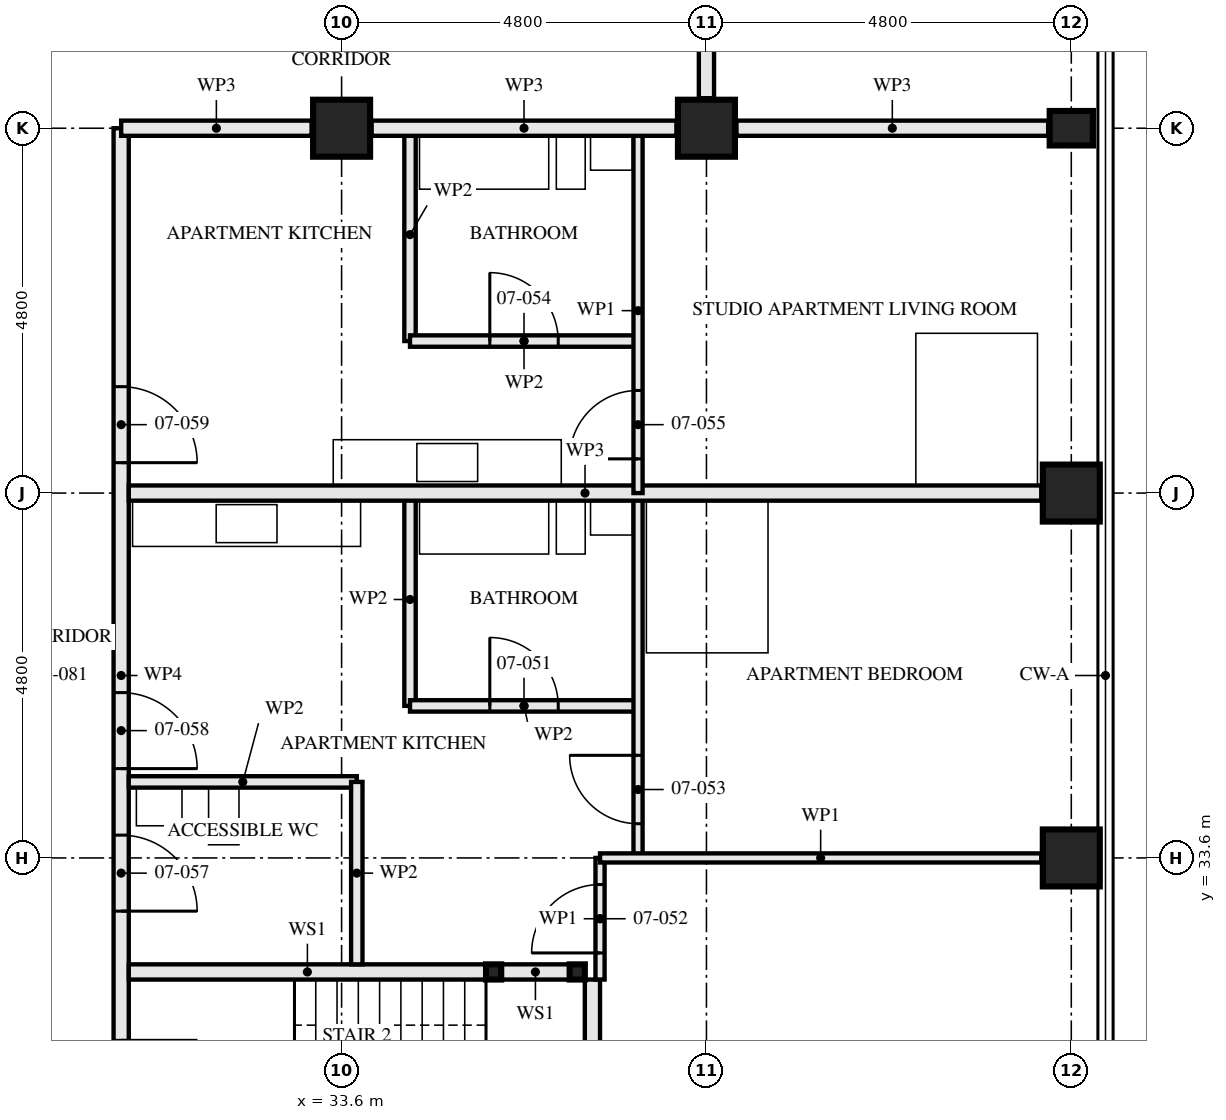
"""IFC4 building model, lengths in metres.
Left out: names, types, materials, properties, quantities, classifications, styles, units other than length and angle.
Written with IfcOpenShell. Run it as: python <this file> out.ifc"""

import sys

from ifc_helpers import new_model, si_unit, direction, frame, frame_2d, origin, origin_2d, place, context, subcontext, project, spatial, rectangle, hollow_rectangle, i_section, extrude, element, fill, save


model = new_model("IFC4")
c1 = context("Model", 3, precision=1e-05, world=origin(), true_north=direction((0.0, 1.0)))
c2 = subcontext(c1, "Body", "Model", "MODEL_VIEW")
j1 = project(units=[si_unit("LENGTHUNIT", "METRE"), si_unit("PLANEANGLEUNIT", "RADIAN")], contexts=[c1])
p1 = place(None, origin())
s1 = spatial("IfcSite", under=j1, at=p1, CompositionType="ELEMENT")
p2 = place(p1, origin())
s2 = spatial("IfcBuilding", under=s1, at=p2, CompositionType="ELEMENT")
p3 = place(p2, frame((0.0, 0.0, 30.5)))
s3 = spatial("IfcBuildingStorey", under=s2, at=p3, CompositionType="ELEMENT", Elevation=30.5)
for number, where, z_axis, x_axis in (
    (1, (33.6, 43.2, 0.0), (0.0, 0.0, 1.0), (0.0, 1.0, 0.0)),
    (2, (38.4, 43.2, 0.0), (0.0, 0.0, 1.0), (0.0, 1.0, 0.0)),
    (3, (43.2, 33.6, 0.0), (0.0, 0.0, 1.0), (1.0, 0.0, 0.0)),
    (4, (43.2, 38.4, 0.0), (0.0, 0.0, 1.0), (1.0, 0.0, 0.0)),
):
    element("IfcColumn", number, at=place(p3, frame(where, z_axis=z_axis, x_axis=x_axis)), inside=s3, PredefinedType="COLUMN", context=c2, shape_type="SweptSolid", body=[
        extrude(hollow_rectangle(XDim=0.75, YDim=0.75, WallThickness=0.08, at=origin_2d()), origin(), (0.0, 0.0, 1.0), 3.5),
    ])
p4 = place(p3, frame((43.2, 43.2, 0.0), z_axis=(0.0, 0.0, 1.0), x_axis=(0.0, 1.0, 0.0)))
e5 = element("IfcColumn", 5, at=p4, inside=s3, PredefinedType="COLUMN", context=c2, shape_type="SweptSolid", body=[
    extrude(i_section(OverallWidth=0.454, OverallDepth=0.569, WebThickness=0.078, FlangeThickness=0.125, FilletRadius=0.015, at=origin_2d()), origin(), (0.0, 0.0, 1.0), 3.5),
])
for number, where, z_axis, x_axis in (
    (6, (36.7, 32.1, 0.0), (0.0, 0.0, 1.0), (1.0, 0.0, 0.0)),
    (7, (35.6, 32.1, 0.0), (0.0, 0.0, 1.0), (1.0, 0.0, 0.0)),
):
    element("IfcColumn", number, at=place(p3, frame(where, z_axis=z_axis, x_axis=x_axis)), inside=s3, PredefinedType="COLUMN", context=c2, shape_type="SweptSolid", body=[
        extrude(hollow_rectangle(XDim=0.2, YDim=0.2, WallThickness=0.008, at=origin_2d()), origin(), (0.0, 0.0, 1.0), 3.33),
    ])
p5 = place(p3, frame((36.6, 32.1, 0.0), z_axis=(0.0, 0.0, 1.0), x_axis=(-1.0, 0.0, 0.0)))
e8 = element("IfcWall", 8, at=p5, inside=s3, PredefinedType="SOLIDWALL", context=c2, shape_type="SweptSolid", body=[
    extrude(rectangle(XDim=0.9, YDim=0.2, at=frame_2d((0.45, 0.0))), origin(), (0.0, 0.0, 1.0), 2.99),
])
p6 = place(p3, frame((35.5, 32.1, 0.0), z_axis=(0.0, 0.0, 1.0), x_axis=(-1.0, 0.0, 0.0)))
e9 = element("IfcWall", 9, at=p6, inside=s3, PredefinedType="SOLIDWALL", context=c2, shape_type="SweptSolid", body=[
    extrude(rectangle(XDim=4.7, YDim=0.2, at=frame_2d((2.35, 0.0))), origin(), (0.0, 0.0, 1.0), 2.99),
])
p7 = place(p3, frame((36.9, 29.4, 0.0), z_axis=(0.0, 0.0, 1.0), x_axis=(0.0, 1.0, 0.0)))
e10 = element("IfcWall", 10, at=p7, inside=s3, PredefinedType="SOLIDWALL", context=c2, shape_type="SweptSolid", body=[
    extrude(rectangle(XDim=2.6, YDim=0.2, at=frame_2d((1.3, 0.0))), origin(), (0.0, 0.0, 1.0), 3.33),
])
p8 = place(p3, frame((33.8, 32.2, 0.0), z_axis=(0.0, 0.0, 1.0), x_axis=(0.0, 1.0, 0.0)))
e11 = element("IfcWall", 11, at=p8, inside=s3, PredefinedType="PARTITIONING", context=c2, shape_type="SweptSolid", body=[
    extrude(rectangle(XDim=2.4, YDim=0.15, at=frame_2d((1.2, 0.0))), origin(), (0.0, 0.0, 1.0), 2.55),
])
p9 = place(p3, frame((33.8, 34.6, 0.0), z_axis=(0.0, 0.0, 1.0), x_axis=(-1.0, 0.0, 0.0)))
e12 = element("IfcWall", 12, at=p9, inside=s3, PredefinedType="PARTITIONING", context=c2, shape_type="SweptSolid", body=[
    extrude(rectangle(XDim=3.0, YDim=0.15, at=frame_2d((1.5, 0.0))), origin(), (0.0, 0.0, 1.0), 3.33),
])
p10 = place(p3, frame((37.5, 35.6, 0.0), z_axis=(0.0, 0.0, 1.0), x_axis=(-1.0, 0.0, 0.0)))
e13 = element("IfcWall", 13, at=p10, inside=s3, PredefinedType="PARTITIONING", context=c2, shape_type="SweptSolid", body=[
    extrude(rectangle(XDim=3.0, YDim=0.15, at=frame_2d((1.5, 0.0))), origin(), (0.0, 0.0, 1.0), 3.33),
])
p11 = place(p10, frame((1.05, 0.0, 0.0)))
e14 = element("IfcOpeningElement", 14, at=p11, cuts=e13, PredefinedType="OPENING", context=c2, shape_type="SweptSolid", body=[
    extrude(rectangle(XDim=0.9, YDim=2.1, at=frame_2d((0.45, 1.05))), frame((0.0, 0.085, 0.0), z_axis=(0.0, -1.0, 0.0), x_axis=(1.0, 0.0, 0.0)), (0.0, 0.0, 1.0), 0.171),
])
p12 = place(p3, frame((34.5, 35.6, 0.0), z_axis=(0.0, 0.0, 1.0), x_axis=(0.0, 1.0, 0.0)))
e15 = element("IfcWall", 15, at=p12, inside=s3, PredefinedType="PARTITIONING", context=c2, shape_type="SweptSolid", body=[
    extrude(rectangle(XDim=2.8, YDim=0.15, at=frame_2d((1.4, 0.0))), origin(), (0.0, 0.0, 1.0), 3.33),
])
p13 = place(p3, frame((37.0, 32.0, 0.0), z_axis=(0.0, 0.0, 1.0), x_axis=(0.0, 1.0, 0.0)))
e16 = element("IfcWall", 16, at=p13, inside=s3, PredefinedType="PARTITIONING", context=c2, shape_type="SweptSolid", body=[
    extrude(rectangle(XDim=1.6, YDim=0.12, at=frame_2d((0.8, 0.0))), origin(), (0.0, 0.0, 1.0), 3.33),
])
p14 = place(p13, frame((0.35, 0.0, 0.0)))
e17 = element("IfcOpeningElement", 17, at=p14, cuts=e16, PredefinedType="OPENING", context=c2, shape_type="SweptSolid", body=[
    extrude(rectangle(XDim=0.9, YDim=2.1, at=frame_2d((0.45, 1.05))), frame((0.0, 0.071, 0.0), z_axis=(0.0, -1.0, 0.0), x_axis=(1.0, 0.0, 0.0)), (0.0, 0.0, 1.0), 0.141),
])
p15 = place(p3, frame((37.5, 33.6, 0.0), z_axis=(0.0, 0.0, 1.0), x_axis=(0.0, 1.0, 0.0)))
e18 = element("IfcWall", 18, at=p15, inside=s3, PredefinedType="PARTITIONING", context=c2, shape_type="SweptSolid", body=[
    extrude(rectangle(XDim=4.8, YDim=0.12, at=frame_2d((2.4, 0.0))), origin(), (0.0, 0.0, 1.0), 3.33),
])
p16 = place(p15, frame((0.45, 0.0, 0.0)))
e19 = element("IfcOpeningElement", 19, at=p16, cuts=e18, PredefinedType="OPENING", context=c2, shape_type="SweptSolid", body=[
    extrude(rectangle(XDim=0.9, YDim=2.1, at=frame_2d((0.45, 1.05))), frame((0.0, 0.071, 0.0), z_axis=(0.0, -1.0, 0.0), x_axis=(1.0, 0.0, 0.0)), (0.0, 0.0, 1.0), 0.141),
])
p17 = place(p3, frame((42.805, 33.6, 0.0), z_axis=(0.0, 0.0, 1.0), x_axis=(-1.0, 0.0, 0.0)))
e20 = element("IfcWall", 20, at=p17, inside=s3, PredefinedType="PARTITIONING", context=c2, shape_type="SweptSolid", body=[
    extrude(rectangle(XDim=5.805, YDim=0.12, at=frame_2d((2.902, 0.0))), origin(), (0.0, 0.0, 1.0), 2.55),
])
p18 = place(p3, frame((42.805, 38.4, 0.0), z_axis=(0.0, 0.0, 1.0), x_axis=(-1.0, 0.0, 0.0)))
e21 = element("IfcWall", 21, at=p18, inside=s3, PredefinedType="PARTITIONING", context=c2, shape_type="SweptSolid", body=[
    extrude(rectangle(XDim=12.005, YDim=0.2, at=frame_2d((6.002, 0.0))), origin(), (0.0, 0.0, 1.0), 2.55),
])
p19 = place(p3, frame((37.5, 40.4, 0.0), z_axis=(0.0, 0.0, 1.0), x_axis=(-1.0, 0.0, 0.0)))
e22 = element("IfcWall", 22, at=p19, inside=s3, PredefinedType="PARTITIONING", context=c2, shape_type="SweptSolid", body=[
    extrude(rectangle(XDim=3.0, YDim=0.15, at=frame_2d((1.5, 0.0))), origin(), (0.0, 0.0, 1.0), 3.33),
])
p20 = place(p19, frame((1.05, 0.0, 0.0)))
e23 = element("IfcOpeningElement", 23, at=p20, cuts=e22, PredefinedType="OPENING", context=c2, shape_type="SweptSolid", body=[
    extrude(rectangle(XDim=0.9, YDim=2.1, at=frame_2d((0.45, 1.05))), frame((0.0, 0.085, 0.0), z_axis=(0.0, -1.0, 0.0), x_axis=(1.0, 0.0, 0.0)), (0.0, 0.0, 1.0), 0.171),
])
p21 = place(p3, frame((34.5, 40.4, 0.0), z_axis=(0.0, 0.0, 1.0), x_axis=(0.0, 1.0, 0.0)))
e24 = element("IfcWall", 24, at=p21, inside=s3, PredefinedType="PARTITIONING", context=c2, shape_type="SweptSolid", body=[
    extrude(rectangle(XDim=2.8, YDim=0.15, at=frame_2d((1.4, 0.0))), origin(), (0.0, 0.0, 1.0), 3.33),
])
p22 = place(p3, frame((37.5, 38.4, 0.0), z_axis=(0.0, 0.0, 1.0), x_axis=(0.0, 1.0, 0.0)))
e25 = element("IfcWall", 25, at=p22, inside=s3, PredefinedType="PARTITIONING", context=c2, shape_type="SweptSolid", body=[
    extrude(rectangle(XDim=4.8, YDim=0.12, at=frame_2d((2.4, 0.0))), origin(), (0.0, 0.0, 1.0), 3.33),
])
p23 = place(p22, frame((0.45, 0.0, 0.0)))
e26 = element("IfcOpeningElement", 26, at=p23, cuts=e25, PredefinedType="OPENING", context=c2, shape_type="SweptSolid", body=[
    extrude(rectangle(XDim=0.9, YDim=2.1, at=frame_2d((0.45, 1.05))), frame((0.0, 0.071, 0.0), z_axis=(0.0, -1.0, 0.0), x_axis=(1.0, 0.0, 0.0)), (0.0, 0.0, 1.0), 0.141),
])
p24 = place(p3, frame((30.7, 28.8, 0.0), z_axis=(0.0, 0.0, 1.0), x_axis=(0.0, 1.0, 0.0)))
e27 = element("IfcWall", 27, at=p24, inside=s3, PredefinedType="PARTITIONING", context=c2, shape_type="SweptSolid", body=[
    extrude(rectangle(XDim=14.4, YDim=0.2, at=frame_2d((7.2, 0.0))), origin(), (0.0, 0.0, 1.0), 2.55),
])
p25 = place(p24, frame((1.4, 0.0, 0.0)))
e28 = element("IfcOpeningElement", 28, at=p25, cuts=e27, PredefinedType="OPENING", context=c2, shape_type="SweptSolid", body=[
    extrude(rectangle(XDim=1.0, YDim=2.1, at=frame_2d((0.5, 1.05))), frame((0.0, 0.111, 0.0), z_axis=(0.0, -1.0, 0.0), x_axis=(1.0, 0.0, 0.0)), (0.0, 0.0, 1.0), 0.221),
])
p26 = place(p24, frame((4.1, 0.0, 0.0)))
e29 = element("IfcOpeningElement", 29, at=p26, cuts=e27, PredefinedType="OPENING", context=c2, shape_type="SweptSolid", body=[
    extrude(rectangle(XDim=1.0, YDim=2.1, at=frame_2d((0.5, 1.05))), frame((0.0, 0.111, 0.0), z_axis=(0.0, -1.0, 0.0), x_axis=(1.0, 0.0, 0.0)), (0.0, 0.0, 1.0), 0.221),
])
p27 = place(p24, frame((5.975, 0.0, 0.0)))
e30 = element("IfcOpeningElement", 30, at=p27, cuts=e27, PredefinedType="OPENING", context=c2, shape_type="SweptSolid", body=[
    extrude(rectangle(XDim=1.0, YDim=2.1, at=frame_2d((0.5, 1.05))), frame((0.0, 0.111, 0.0), z_axis=(0.0, -1.0, 0.0), x_axis=(1.0, 0.0, 0.0)), (0.0, 0.0, 1.0), 0.221),
])
p28 = place(p24, frame((10.0, 0.0, 0.0)))
e31 = element("IfcOpeningElement", 31, at=p28, cuts=e27, PredefinedType="OPENING", context=c2, shape_type="SweptSolid", body=[
    extrude(rectangle(XDim=1.0, YDim=2.1, at=frame_2d((0.5, 1.05))), frame((0.0, 0.111, 0.0), z_axis=(0.0, -1.0, 0.0), x_axis=(1.0, 0.0, 0.0)), (0.0, 0.0, 1.0), 0.221),
])
p29 = place(p3, frame((38.4, 45.2, 0.0), z_axis=(0.0, 0.0, 1.0), x_axis=(0.0, -1.0, 0.0)))
e32 = element("IfcWall", 32, at=p29, inside=s3, PredefinedType="PARTITIONING", context=c2, shape_type="SweptSolid", body=[
    extrude(rectangle(XDim=1.605, YDim=0.2, at=frame_2d((0.802, 0.0))), origin(), (0.0, 0.0, 1.0), 3.33),
])
p30 = place(p3, frame((42.896, 43.2, 0.0), z_axis=(0.0, 0.0, 1.0), x_axis=(-1.0, 0.0, 0.0)))
e33 = element("IfcWall", 33, at=p30, inside=s3, PredefinedType="PARTITIONING", context=c2, shape_type="SweptSolid", body=[
    extrude(rectangle(XDim=4.101, YDim=0.2, at=frame_2d((2.05, 0.0))), origin(), (0.0, 0.0, 1.0), 2.32),
])
p31 = place(p3, frame((38.005, 43.2, 0.0), z_axis=(0.0, 0.0, 1.0), x_axis=(-1.0, 0.0, 0.0)))
e34 = element("IfcWall", 34, at=p31, inside=s3, PredefinedType="PARTITIONING", context=c2, shape_type="SweptSolid", body=[
    extrude(rectangle(XDim=4.01, YDim=0.2, at=frame_2d((2.005, 0.0))), origin(), (0.0, 0.0, 1.0), 2.32),
])
p32 = place(p3, frame((33.205, 43.2, 0.0), z_axis=(0.0, 0.0, 1.0), x_axis=(-1.0, 0.0, 0.0)))
e35 = element("IfcWall", 35, at=p32, inside=s3, PredefinedType="PARTITIONING", context=c2, shape_type="SweptSolid", body=[
    extrude(rectangle(XDim=2.505, YDim=0.2, at=frame_2d((1.252, 0.0))), origin(), (0.0, 0.0, 1.0), 2.32),
])
p33 = place(p11, frame((0.9, 0.0, 0.0), z_axis=(0.0, 0.0, 1.0), x_axis=(-1.0, 0.0, 0.0)))
e36 = element("IfcDoor", 36, at=p33, inside=s3, OperationType="SINGLE_SWING_RIGHT", PredefinedType="DOOR", context=c2, shape_type="SweptSolid", body=[
    extrude(rectangle(XDim=0.9, YDim=2.1, at=frame_2d((0.45, 1.05))), frame((0.0, 0.022, 0.0), z_axis=(0.0, -1.0, 0.0), x_axis=(1.0, 0.0, 0.0)), (0.0, 0.0, 1.0), 0.044),
])
fill(e14, e36)
p34 = place(p14, origin())
e37 = element("IfcDoor", 37, at=p34, inside=s3, OperationType="SINGLE_SWING_RIGHT", PredefinedType="DOOR", context=c2, shape_type="SweptSolid", body=[
    extrude(rectangle(XDim=0.9, YDim=2.1, at=frame_2d((0.45, 1.05))), frame((0.0, 0.022, 0.0), z_axis=(0.0, -1.0, 0.0), x_axis=(1.0, 0.0, 0.0)), (0.0, 0.0, 1.0), 0.044),
])
fill(e17, e37)
p35 = place(p16, origin())
e38 = element("IfcDoor", 38, at=p35, inside=s3, OperationType="SINGLE_SWING_LEFT", PredefinedType="DOOR", context=c2, shape_type="SweptSolid", body=[
    extrude(rectangle(XDim=0.9, YDim=2.1, at=frame_2d((0.45, 1.05))), frame((0.0, 0.022, 0.0), z_axis=(0.0, -1.0, 0.0), x_axis=(1.0, 0.0, 0.0)), (0.0, 0.0, 1.0), 0.044),
])
fill(e19, e38)
p36 = place(p20, frame((0.9, 0.0, 0.0), z_axis=(0.0, 0.0, 1.0), x_axis=(-1.0, 0.0, 0.0)))
e39 = element("IfcDoor", 39, at=p36, inside=s3, OperationType="SINGLE_SWING_RIGHT", PredefinedType="DOOR", context=c2, shape_type="SweptSolid", body=[
    extrude(rectangle(XDim=0.9, YDim=2.1, at=frame_2d((0.45, 1.05))), frame((0.0, 0.022, 0.0), z_axis=(0.0, -1.0, 0.0), x_axis=(1.0, 0.0, 0.0)), (0.0, 0.0, 1.0), 0.044),
])
fill(e23, e39)
p37 = place(p23, origin())
e40 = element("IfcDoor", 40, at=p37, inside=s3, OperationType="SINGLE_SWING_RIGHT", PredefinedType="DOOR", context=c2, shape_type="SweptSolid", body=[
    extrude(rectangle(XDim=0.9, YDim=2.1, at=frame_2d((0.45, 1.05))), frame((0.0, 0.022, 0.0), z_axis=(0.0, -1.0, 0.0), x_axis=(1.0, 0.0, 0.0)), (0.0, 0.0, 1.0), 0.044),
])
fill(e26, e40)
p38 = place(p26, frame((1.0, 0.0, 0.0), z_axis=(0.0, 0.0, 1.0), x_axis=(-1.0, 0.0, 0.0)))
e41 = element("IfcDoor", 41, at=p38, inside=s3, OperationType="SINGLE_SWING_LEFT", PredefinedType="DOOR", context=c2, shape_type="SweptSolid", body=[
    extrude(rectangle(XDim=1.0, YDim=2.1, at=frame_2d((0.5, 1.05))), frame((0.0, 0.027, 0.0), z_axis=(0.0, -1.0, 0.0), x_axis=(1.0, 0.0, 0.0)), (0.0, 0.0, 1.0), 0.054),
])
fill(e29, e41)
p39 = place(p27, frame((1.0, 0.0, 0.0), z_axis=(0.0, 0.0, 1.0), x_axis=(-1.0, 0.0, 0.0)))
e42 = element("IfcDoor", 42, at=p39, inside=s3, OperationType="SINGLE_SWING_LEFT", PredefinedType="DOOR", context=c2, shape_type="SweptSolid", body=[
    extrude(rectangle(XDim=1.0, YDim=2.1, at=frame_2d((0.5, 1.05))), frame((0.0, 0.027, 0.0), z_axis=(0.0, -1.0, 0.0), x_axis=(1.0, 0.0, 0.0)), (0.0, 0.0, 1.0), 0.054),
])
fill(e30, e42)
p40 = place(p28, frame((1.0, 0.0, 0.0), z_axis=(0.0, 0.0, 1.0), x_axis=(-1.0, 0.0, 0.0)))
e43 = element("IfcDoor", 43, at=p40, inside=s3, OperationType="SINGLE_SWING_LEFT", PredefinedType="DOOR", context=c2, shape_type="SweptSolid", body=[
    extrude(rectangle(XDim=1.0, YDim=2.1, at=frame_2d((0.5, 1.05))), frame((0.0, 0.027, 0.0), z_axis=(0.0, -1.0, 0.0), x_axis=(1.0, 0.0, 0.0)), (0.0, 0.0, 1.0), 0.054),
])
fill(e31, e43)
save(model, sys.argv[1])
